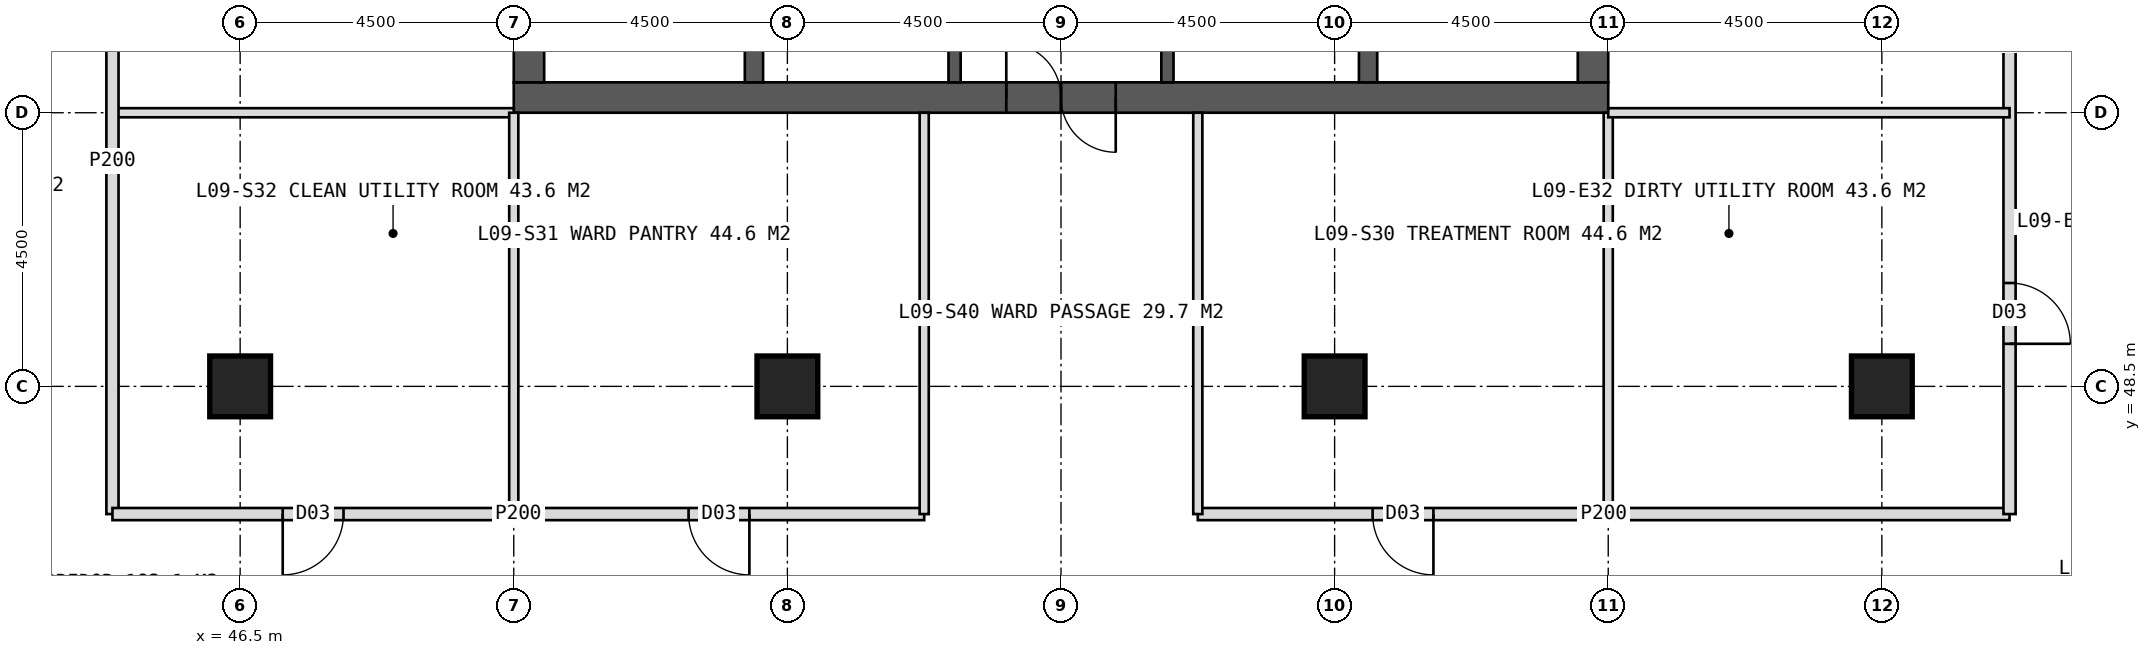
"""IFC4 building model, lengths in metres.
Left out: names, types, materials, properties, quantities, classifications, styles, units other than length and angle.
Written with IfcOpenShell. Run it as: python <this file> out.ifc"""

import sys

from ifc_helpers import new_model, si_unit, direction, frame, frame_2d, origin, origin_2d, place, context, subcontext, project, spatial, rectangle, hollow_rectangle, extrude, element, fill, save


model = new_model("IFC4")
c1 = context("Model", 3, precision=1e-05, world=origin(), true_north=direction((0.0, 1.0)))
c2 = subcontext(c1, "Body", "Model", "MODEL_VIEW")
j1 = project(units=[si_unit("LENGTHUNIT", "METRE"), si_unit("PLANEANGLEUNIT", "RADIAN")], contexts=[c1])
p1 = place(None, origin())
s1 = spatial("IfcSite", under=j1, at=p1, CompositionType="ELEMENT")
p2 = place(p1, origin())
s2 = spatial("IfcBuilding", under=s1, at=p2, CompositionType="ELEMENT")
p3 = place(p2, frame((0.0, 0.0, 43.0)))
s3 = spatial("IfcBuildingStorey", under=s2, at=p3, CompositionType="ELEMENT", Elevation=43.0)
p4 = place(p3, frame((51.0, 53.25, 0.0), z_axis=(0.0, 0.0, 1.0), x_axis=(1.0, 0.0, 0.0)))
e1 = element("IfcWall", 1, at=p4, inside=s3, PredefinedType="SHEAR", context=c2, shape_type="SweptSolid", body=[
    extrude(rectangle(XDim=18.0, YDim=0.5, at=frame_2d((9.0, 0.0))), origin(), (0.0, 0.0, 1.0), 4.0),
])
p5 = place(p4, frame((8.1, 0.0, 0.0)))
e2 = element("IfcOpeningElement", 2, at=p5, cuts=e1, PredefinedType="OPENING", context=c2, shape_type="SweptSolid", body=[
    extrude(rectangle(XDim=1.8, YDim=2.2, at=frame_2d((0.9, 1.1))), frame((0.0, 0.26, 0.0), z_axis=(0.0, -1.0, 0.0), x_axis=(1.0, 0.0, 0.0)), (0.0, 0.0, 1.0), 0.52),
])
p6 = place(p3, frame((51.25, 53.5, 0.0), z_axis=(0.0, 0.0, 1.0), x_axis=(0.0, 1.0, 0.0)))
e3 = element("IfcWall", 3, at=p6, inside=s3, PredefinedType="SHEAR", context=c2, shape_type="SweptSolid", body=[
    extrude(rectangle(XDim=17.0, YDim=0.5, at=frame_2d((8.5, 0.0))), origin(), (0.0, 0.0, 1.0), 4.0),
])
p7 = place(p6, frame((6.0, 0.0, 0.0)))
e4 = element("IfcOpeningElement", 4, at=p7, cuts=e3, PredefinedType="OPENING", context=c2, shape_type="SweptSolid", body=[
    extrude(rectangle(XDim=1.5, YDim=2.2, at=frame_2d((0.75, 1.1))), frame((0.0, 0.26, 0.0), z_axis=(0.0, -1.0, 0.0), x_axis=(1.0, 0.0, 0.0)), (0.0, 0.0, 1.0), 0.52),
])
p8 = place(p3, frame((68.75, 53.5, 0.0), z_axis=(0.0, 0.0, 1.0), x_axis=(0.0, 1.0, 0.0)))
e5 = element("IfcWall", 5, at=p8, inside=s3, PredefinedType="SHEAR", context=c2, shape_type="SweptSolid", body=[
    extrude(rectangle(XDim=17.0, YDim=0.5, at=frame_2d((8.5, 0.0))), origin(), (0.0, 0.0, 1.0), 4.0),
])
p9 = place(p8, frame((9.5, 0.0, 0.0)))
e6 = element("IfcOpeningElement", 6, at=p9, cuts=e5, PredefinedType="OPENING", context=c2, shape_type="SweptSolid", body=[
    extrude(rectangle(XDim=1.5, YDim=2.2, at=frame_2d((0.75, 1.1))), frame((0.0, 0.26, 0.0), z_axis=(0.0, -1.0, 0.0), x_axis=(1.0, 0.0, 0.0)), (0.0, 0.0, 1.0), 0.52),
])
for number, where, z_axis, x_axis in (
    (7, (54.95, 53.5, 0.0), (0.0, 0.0, 1.0), (0.0, 1.0, 0.0)),
    (8, (65.05, 53.5, 0.0), (0.0, 0.0, 1.0), (0.0, 1.0, 0.0)),
):
    element("IfcWall", number, at=place(p3, frame(where, z_axis=z_axis, x_axis=x_axis)), inside=s3, PredefinedType="SHEAR", context=c2, shape_type="SweptSolid", body=[
        extrude(rectangle(XDim=17.0, YDim=0.3, at=frame_2d((8.5, 0.0))), origin(), (0.0, 0.0, 1.0), 4.0),
    ])
p10 = place(p3, frame((58.25, 53.5, 0.0), z_axis=(0.0, 0.0, 1.0), x_axis=(0.0, 1.0, 0.0)))
e9 = element("IfcWall", 9, at=p10, inside=s3, PredefinedType="SHEAR", context=c2, shape_type="SweptSolid", body=[
    extrude(rectangle(XDim=17.0, YDim=0.2, at=frame_2d((8.5, 0.0))), origin(), (0.0, 0.0, 1.0), 4.0),
])
p11 = place(p10, frame((1.375, 0.0, 0.0)))
e10 = element("IfcOpeningElement", 10, at=p11, cuts=e9, PredefinedType="OPENING", context=c2, shape_type="SweptSolid", body=[
    extrude(rectangle(XDim=1.4, YDim=2.2, at=frame_2d((0.7, 1.1))), frame((0.0, 0.11, 0.0), z_axis=(0.0, -1.0, 0.0), x_axis=(1.0, 0.0, 0.0)), (0.0, 0.0, 1.0), 0.22),
])
p12 = place(p10, frame((5.675, 0.0, 0.0)))
e11 = element("IfcOpeningElement", 11, at=p12, cuts=e9, PredefinedType="OPENING", context=c2, shape_type="SweptSolid", body=[
    extrude(rectangle(XDim=1.4, YDim=2.2, at=frame_2d((0.7, 1.1))), frame((0.0, 0.11, 0.0), z_axis=(0.0, -1.0, 0.0), x_axis=(1.0, 0.0, 0.0)), (0.0, 0.0, 1.0), 0.22),
])
p13 = place(p3, frame((61.75, 53.5, 0.0), z_axis=(0.0, 0.0, 1.0), x_axis=(0.0, 1.0, 0.0)))
e12 = element("IfcWall", 12, at=p13, inside=s3, PredefinedType="SHEAR", context=c2, shape_type="SweptSolid", body=[
    extrude(rectangle(XDim=17.0, YDim=0.2, at=frame_2d((8.5, 0.0))), origin(), (0.0, 0.0, 1.0), 4.0),
])
p14 = place(p13, frame((1.375, 0.0, 0.0)))
e13 = element("IfcOpeningElement", 13, at=p14, cuts=e12, PredefinedType="OPENING", context=c2, shape_type="SweptSolid", body=[
    extrude(rectangle(XDim=1.4, YDim=2.2, at=frame_2d((0.7, 1.1))), frame((0.0, 0.11, 0.0), z_axis=(0.0, -1.0, 0.0), x_axis=(1.0, 0.0, 0.0)), (0.0, 0.0, 1.0), 0.22),
])
p15 = place(p13, frame((5.675, 0.0, 0.0)))
e14 = element("IfcOpeningElement", 14, at=p15, cuts=e12, PredefinedType="OPENING", context=c2, shape_type="SweptSolid", body=[
    extrude(rectangle(XDim=1.4, YDim=2.2, at=frame_2d((0.7, 1.1))), frame((0.0, 0.11, 0.0), z_axis=(0.0, -1.0, 0.0), x_axis=(1.0, 0.0, 0.0)), (0.0, 0.0, 1.0), 0.22),
])
for number, where, z_axis, x_axis in (
    (15, (46.5, 48.5, 0.0), (0.0, 0.0, 1.0), (1.0, 0.0, 0.0)),
    (16, (73.5, 48.5, 0.0), (0.0, 0.0, 1.0), (1.0, 0.0, 0.0)),
    (17, (55.5, 48.5, 0.0), (0.0, 0.0, 1.0), (1.0, 0.0, 0.0)),
    (18, (64.5, 48.5, 0.0), (0.0, 0.0, 1.0), (1.0, 0.0, 0.0)),
):
    element("IfcColumn", number, at=place(p3, frame(where, z_axis=z_axis, x_axis=x_axis)), inside=s3, PredefinedType="COLUMN", context=c2, shape_type="SweptSolid", body=[
        extrude(hollow_rectangle(XDim=1.0, YDim=1.0, WallThickness=0.1, at=origin_2d()), origin(), (0.0, 0.0, 1.0), 4.0),
    ])
p16 = place(p3, frame((51.0, 53.0, 0.0), z_axis=(0.0, 0.0, 1.0), x_axis=(-1.0, 0.0, 0.0)))
e19 = element("IfcWall", 19, at=p16, inside=s3, PredefinedType="PARTITIONING", context=c2, shape_type="SweptSolid", body=[
    extrude(rectangle(XDim=6.6, YDim=0.15, at=frame_2d((3.3, 0.0))), origin(), (0.0, 0.0, 1.0), 3.75),
])
p17 = place(p3, frame((44.4, 46.4, 0.0), z_axis=(0.0, 0.0, 1.0), x_axis=(0.0, 1.0, 0.0)))
e20 = element("IfcWall", 20, at=p17, inside=s3, PredefinedType="PARTITIONING", context=c2, shape_type="SweptSolid", body=[
    extrude(rectangle(XDim=11.6, YDim=0.2, at=frame_2d((5.8, 0.0))), origin(), (0.0, 0.0, 1.0), 3.75),
])
p18 = place(p17, frame((8.6, 0.0, 0.0)))
e21 = element("IfcOpeningElement", 21, at=p18, cuts=e20, PredefinedType="OPENING", context=c2, shape_type="SweptSolid", body=[
    extrude(rectangle(XDim=1.0, YDim=2.1, at=frame_2d((0.5, 1.05))), frame((0.0, 0.11, 0.0), z_axis=(0.0, -1.0, 0.0), x_axis=(1.0, 0.0, 0.0)), (0.0, 0.0, 1.0), 0.22),
])
p19 = place(p3, frame((69.0, 53.0, 0.0), z_axis=(0.0, 0.0, 1.0), x_axis=(0.0, -1.0, 0.0)))
e22 = element("IfcWall", 22, at=p19, inside=s3, PredefinedType="PARTITIONING", context=c2, shape_type="SweptSolid", body=[
    extrude(rectangle(XDim=6.6, YDim=0.15, at=frame_2d((3.3, 0.0))), origin(), (0.0, 0.0, 1.0), 3.75),
])
p20 = place(p3, frame((75.6, 46.4, 0.0), z_axis=(0.0, 0.0, 1.0), x_axis=(-1.0, 0.0, 0.0)))
e23 = element("IfcWall", 23, at=p20, inside=s3, PredefinedType="PARTITIONING", context=c2, shape_type="SweptSolid", body=[
    extrude(rectangle(XDim=13.35, YDim=0.2, at=frame_2d((6.675, 0.0))), origin(), (0.0, 0.0, 1.0), 3.75),
])
p21 = place(p20, frame((9.475, 0.0, 0.0)))
e24 = element("IfcOpeningElement", 24, at=p21, cuts=e23, PredefinedType="OPENING", context=c2, shape_type="SweptSolid", body=[
    extrude(rectangle(XDim=1.0, YDim=2.1, at=frame_2d((0.5, 1.05))), frame((0.0, 0.11, 0.0), z_axis=(0.0, -1.0, 0.0), x_axis=(1.0, 0.0, 0.0)), (0.0, 0.0, 1.0), 0.22),
])
p22 = place(p3, frame((57.75, 46.4, 0.0), z_axis=(0.0, 0.0, 1.0), x_axis=(-1.0, 0.0, 0.0)))
e25 = element("IfcWall", 25, at=p22, inside=s3, PredefinedType="PARTITIONING", context=c2, shape_type="SweptSolid", body=[
    extrude(rectangle(XDim=13.35, YDim=0.2, at=frame_2d((6.675, 0.0))), origin(), (0.0, 0.0, 1.0), 3.75),
])
p23 = place(p22, frame((2.875, 0.0, 0.0)))
e26 = element("IfcOpeningElement", 26, at=p23, cuts=e25, PredefinedType="OPENING", context=c2, shape_type="SweptSolid", body=[
    extrude(rectangle(XDim=1.0, YDim=2.1, at=frame_2d((0.5, 1.05))), frame((0.0, 0.11, 0.0), z_axis=(0.0, -1.0, 0.0), x_axis=(1.0, 0.0, 0.0)), (0.0, 0.0, 1.0), 0.22),
])
p24 = place(p22, frame((9.55, 0.0, 0.0)))
e27 = element("IfcOpeningElement", 27, at=p24, cuts=e25, PredefinedType="OPENING", context=c2, shape_type="SweptSolid", body=[
    extrude(rectangle(XDim=1.0, YDim=2.1, at=frame_2d((0.5, 1.05))), frame((0.0, 0.11, 0.0), z_axis=(0.0, -1.0, 0.0), x_axis=(1.0, 0.0, 0.0)), (0.0, 0.0, 1.0), 0.22),
])
for number, where, z_axis, x_axis in (
    (28, (62.25, 53.0, 0.0), (0.0, 0.0, 1.0), (0.0, -1.0, 0.0)),
    (29, (57.75, 53.0, 0.0), (0.0, 0.0, 1.0), (0.0, -1.0, 0.0)),
    (30, (51.0, 53.0, 0.0), (0.0, 0.0, 1.0), (0.0, -1.0, 0.0)),
):
    element("IfcWall", number, at=place(p3, frame(where, z_axis=z_axis, x_axis=x_axis)), inside=s3, PredefinedType="PARTITIONING", context=c2, shape_type="SweptSolid", body=[
        extrude(rectangle(XDim=6.6, YDim=0.15, at=frame_2d((3.3, 0.0))), origin(), (0.0, 0.0, 1.0), 3.75),
    ])
p25 = place(p3, frame((75.6, 62.0, 0.0), z_axis=(0.0, 0.0, 1.0), x_axis=(0.0, -1.0, 0.0)))
e31 = element("IfcWall", 31, at=p25, inside=s3, PredefinedType="PARTITIONING", context=c2, shape_type="SweptSolid", body=[
    extrude(rectangle(XDim=15.6, YDim=0.2, at=frame_2d((7.8, 0.0))), origin(), (0.0, 0.0, 1.0), 3.75),
])
p26 = place(p25, frame((4.0, 0.0, 0.0)))
e32 = element("IfcOpeningElement", 32, at=p26, cuts=e31, PredefinedType="OPENING", context=c2, shape_type="SweptSolid", body=[
    extrude(rectangle(XDim=1.0, YDim=2.1, at=frame_2d((0.5, 1.05))), frame((0.0, 0.11, 0.0), z_axis=(0.0, -1.0, 0.0), x_axis=(1.0, 0.0, 0.0)), (0.0, 0.0, 1.0), 0.22),
])
p27 = place(p25, frame((11.8, 0.0, 0.0)))
e33 = element("IfcOpeningElement", 33, at=p27, cuts=e31, PredefinedType="OPENING", context=c2, shape_type="SweptSolid", body=[
    extrude(rectangle(XDim=1.0, YDim=2.1, at=frame_2d((0.5, 1.05))), frame((0.0, 0.11, 0.0), z_axis=(0.0, -1.0, 0.0), x_axis=(1.0, 0.0, 0.0)), (0.0, 0.0, 1.0), 0.22),
])
p28 = place(p3, frame((69.0, 53.0, 0.0), z_axis=(0.0, 0.0, 1.0), x_axis=(1.0, 0.0, 0.0)))
e34 = element("IfcWall", 34, at=p28, inside=s3, PredefinedType="PARTITIONING", context=c2, shape_type="SweptSolid", body=[
    extrude(rectangle(XDim=6.6, YDim=0.15, at=frame_2d((3.3, 0.0))), origin(), (0.0, 0.0, 1.0), 3.75),
])
p29 = place(p21, origin())
e35 = element("IfcDoor", 35, at=p29, inside=s3, OperationType="SINGLE_SWING_LEFT", PredefinedType="DOOR", context=c2, shape_type="SweptSolid", body=[
    extrude(rectangle(XDim=1.0, YDim=2.1, at=frame_2d((0.5, 1.05))), frame((0.0, 0.025, 0.0), z_axis=(0.0, -1.0, 0.0), x_axis=(1.0, 0.0, 0.0)), (0.0, 0.0, 1.0), 0.05),
])
fill(e24, e35)
p30 = place(p23, origin())
e36 = element("IfcDoor", 36, at=p30, inside=s3, OperationType="SINGLE_SWING_LEFT", PredefinedType="DOOR", context=c2, shape_type="SweptSolid", body=[
    extrude(rectangle(XDim=1.0, YDim=2.1, at=frame_2d((0.5, 1.05))), frame((0.0, 0.025, 0.0), z_axis=(0.0, -1.0, 0.0), x_axis=(1.0, 0.0, 0.0)), (0.0, 0.0, 1.0), 0.05),
])
fill(e26, e36)
p31 = place(p24, origin())
e37 = element("IfcDoor", 37, at=p31, inside=s3, OperationType="SINGLE_SWING_RIGHT", PredefinedType="DOOR", context=c2, shape_type="SweptSolid", body=[
    extrude(rectangle(XDim=1.0, YDim=2.1, at=frame_2d((0.5, 1.05))), frame((0.0, 0.025, 0.0), z_axis=(0.0, -1.0, 0.0), x_axis=(1.0, 0.0, 0.0)), (0.0, 0.0, 1.0), 0.05),
])
fill(e27, e37)
p32 = place(p27, origin())
e38 = element("IfcDoor", 38, at=p32, inside=s3, OperationType="SINGLE_SWING_RIGHT", PredefinedType="DOOR", context=c2, shape_type="SweptSolid", body=[
    extrude(rectangle(XDim=1.0, YDim=2.1, at=frame_2d((0.5, 1.05))), frame((0.0, 0.025, 0.0), z_axis=(0.0, -1.0, 0.0), x_axis=(1.0, 0.0, 0.0)), (0.0, 0.0, 1.0), 0.05),
])
fill(e33, e38)
p33 = place(p5, origin())
e39 = element("IfcDoor", 39, at=p33, inside=s3, OperationType="DOUBLE_DOOR_SINGLE_SWING", PredefinedType="DOOR", context=c2, shape_type="SweptSolid", body=[
    extrude(rectangle(XDim=1.8, YDim=2.2, at=frame_2d((0.9, 1.1))), frame((0.0, 0.025, 0.0), z_axis=(0.0, -1.0, 0.0), x_axis=(1.0, 0.0, 0.0)), (0.0, 0.0, 1.0), 0.05),
])
fill(e2, e39)
save(model, sys.argv[1])
